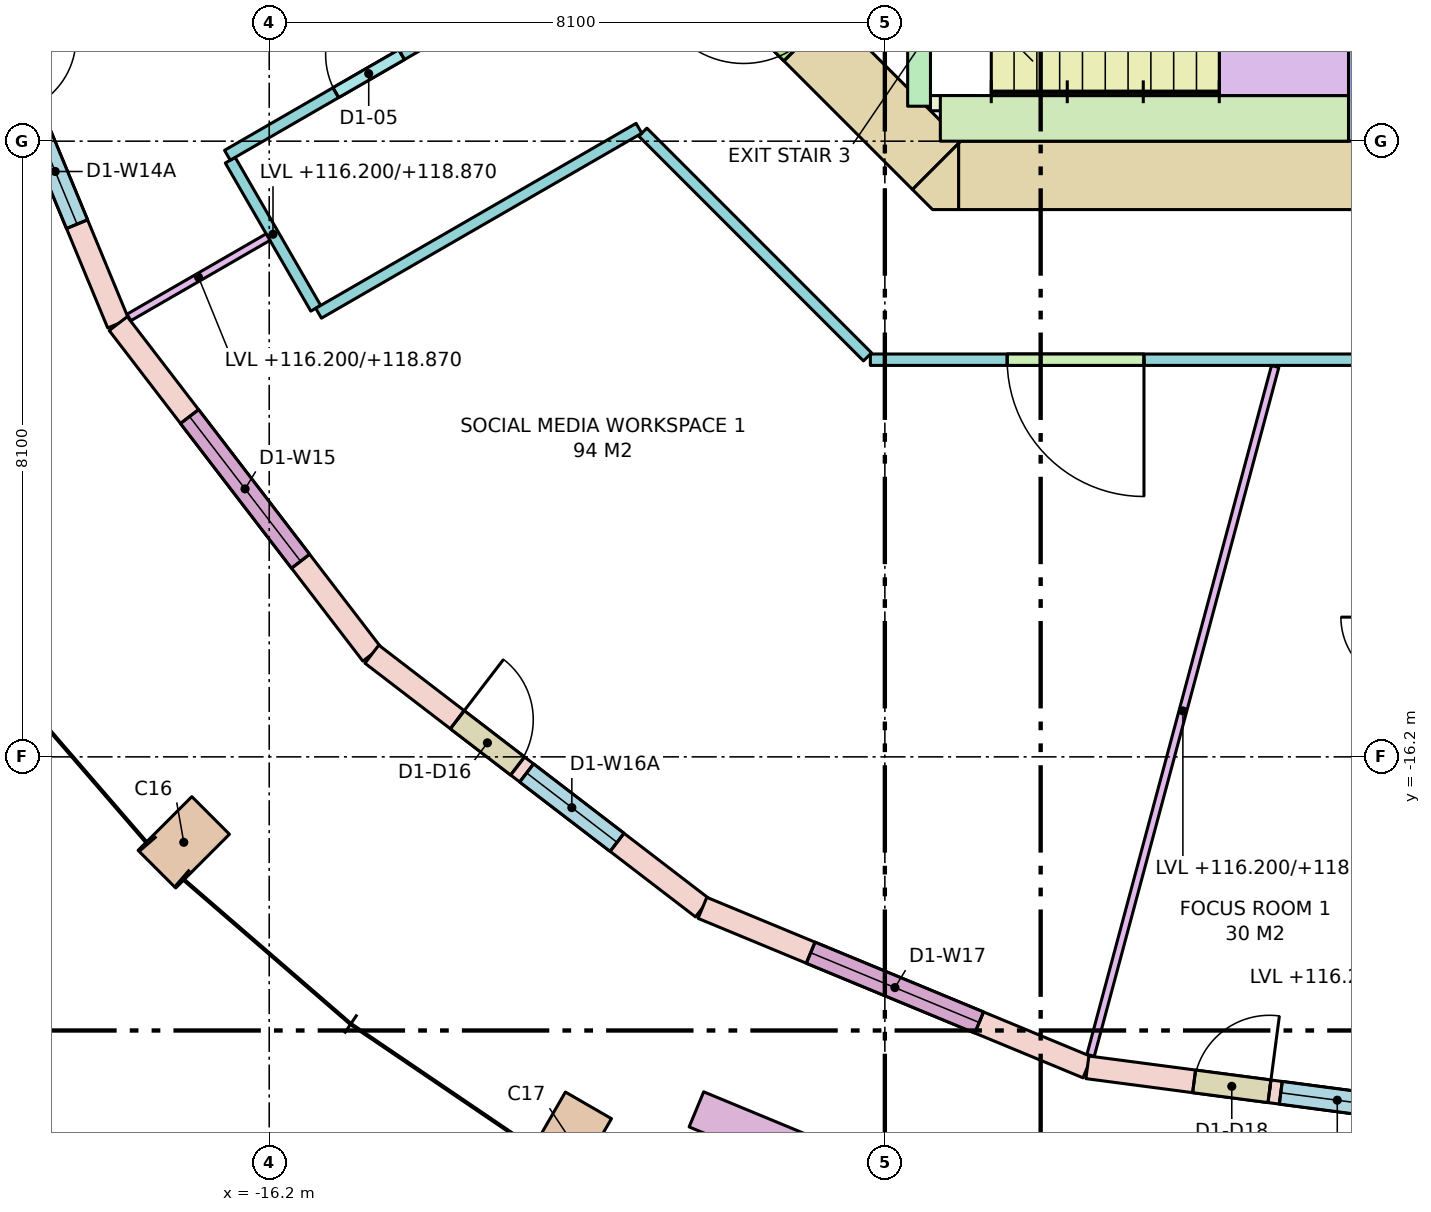
"""IFC4 building model, lengths in metres.
Left out: names, types, materials, properties, quantities, classifications, styles, units other than length and angle.
Written with IfcOpenShell. Run it as: python <this file> out.ifc"""

import sys

from ifc_helpers import new_model, si_unit, direction, frame, frame_2d, origin, origin_2d, place, context, subcontext, project, spatial, polyline, rectangle, outline, extrude, element, fill, save


model = new_model("IFC4")
c1 = context("Model", 3, precision=1e-05, world=origin(), true_north=direction((0.0, 1.0)))
c2 = subcontext(c1, "Body", "Model", "MODEL_VIEW")
j1 = project(units=[si_unit("LENGTHUNIT", "METRE"), si_unit("PLANEANGLEUNIT", "RADIAN")], contexts=[c1])
p1 = place(None, origin())
s1 = spatial("IfcSite", under=j1, at=p1, CompositionType="ELEMENT")
p2 = place(p1, origin())
s2 = spatial("IfcBuilding", under=s1, at=p2, CompositionType="ELEMENT")
p3 = place(p2, frame((0.0, 0.0, 116.2)))
s3 = spatial("IfcBuildingStorey", under=s2, at=p3, CompositionType="ELEMENT", Elevation=116.2)
for number, where, z_axis, x_axis in (
    (1, (-17.324, -17.324, 0.0), (0.0, 0.0, 1.0), (0.707, -0.707, 0.0)),
    (2, (-12.25, -21.218, 0.0), (0.0, 0.0, 1.0), (0.866, -0.5, 0.0)),
):
    element("IfcColumn", number, at=place(p3, frame(where, z_axis=z_axis, x_axis=x_axis)), inside=s3, PredefinedType="COLUMN", context=c2, shape_type="SweptSolid", body=[
        extrude(rectangle(XDim=0.7, YDim=1.0, at=origin_2d()), origin(), (0.0, 0.0, 1.0), 3.8),
    ])
p4 = place(p3, frame((-7.13, -8.55, -0.28), z_axis=(0.0, 0.0, 1.0), x_axis=(1.0, 0.0, 0.0)))
e3 = element("IfcWall", 3, at=p4, inside=s3, PredefinedType="SHEAR", context=c2, shape_type="SweptSolid", body=[
    extrude(rectangle(XDim=14.26, YDim=0.9, at=frame_2d((7.13, 0.0))), origin(), (0.0, 0.0, 1.0), 3.8),
])
p5 = place(p4, frame((8.08, 0.0, 0.28)))
e4 = element("IfcOpeningElement", 4, at=p5, cuts=e3, PredefinedType="OPENING", context=c2, shape_type="SweptSolid", body=[
    extrude(rectangle(XDim=0.7, YDim=2.1, at=frame_2d((0.35, 1.05))), frame((0.0, 0.46, 0.0), z_axis=(0.0, -1.0, 0.0), x_axis=(1.0, 0.0, 0.0)), (0.0, 0.0, 1.0), 0.92),
])
p6 = place(p4, frame((5.58, 0.0, 0.28)))
e5 = element("IfcOpeningElement", 5, at=p6, cuts=e3, PredefinedType="OPENING", context=c2, shape_type="SweptSolid", body=[
    extrude(rectangle(XDim=0.85, YDim=2.1, at=frame_2d((0.425, 1.05))), frame((0.0, 0.46, 0.0), z_axis=(0.0, -1.0, 0.0), x_axis=(1.0, 0.0, 0.0)), (0.0, 0.0, 1.0), 0.92),
])
p7 = place(p4, frame((6.88, 0.0, 0.28)))
e6 = element("IfcOpeningElement", 6, at=p7, cuts=e3, PredefinedType="OPENING", context=c2, shape_type="SweptSolid", body=[
    extrude(rectangle(XDim=0.85, YDim=2.1, at=frame_2d((0.425, 1.05))), frame((0.0, 0.46, 0.0), z_axis=(0.0, -1.0, 0.0), x_axis=(1.0, 0.0, 0.0)), (0.0, 0.0, 1.0), 0.92),
])
p8 = place(p4, frame((9.967, 0.0, 0.28)))
e7 = element("IfcOpeningElement", 7, at=p8, cuts=e3, PredefinedType="OPENING", context=c2, shape_type="SweptSolid", body=[
    extrude(rectangle(XDim=0.9, YDim=2.1, at=frame_2d((0.45, 1.05))), frame((0.0, 0.46, 0.0), z_axis=(0.0, -1.0, 0.0), x_axis=(1.0, 0.0, 0.0)), (0.0, 0.0, 1.0), 0.92),
])
p9 = place(p4, frame((12.567, 0.0, 0.28)))
e8 = element("IfcOpeningElement", 8, at=p9, cuts=e3, PredefinedType="OPENING", context=c2, shape_type="SweptSolid", body=[
    extrude(rectangle(XDim=0.9, YDim=2.1, at=frame_2d((0.45, 1.05))), frame((0.0, 0.46, 0.0), z_axis=(0.0, -1.0, 0.0), x_axis=(1.0, 0.0, 0.0)), (0.0, 0.0, 1.0), 0.92),
])
p10 = place(p3, frame((-7.418, -8.418, -0.28), z_axis=(0.0, 0.0, 1.0), x_axis=(-0.707106781187, 0.707106781187, 0.0)))
e9 = element("IfcWall", 9, at=p10, inside=s3, PredefinedType="SHEAR", context=c2, shape_type="SweptSolid", body=[
    extrude(rectangle(XDim=4.243, YDim=0.9, at=frame_2d((2.121, 0.0))), origin(), (0.0, 0.0, 1.0), 3.8),
])
p11 = place(p10, frame((2.393, 0.0, 0.28)))
e10 = element("IfcOpeningElement", 10, at=p11, cuts=e9, PredefinedType="OPENING", context=c2, shape_type="SweptSolid", body=[
    extrude(rectangle(XDim=1.2, YDim=2.1, at=frame_2d((0.6, 1.05))), frame((0.0, 0.46, 0.0), z_axis=(0.0, -1.0, 0.0), x_axis=(1.0, 0.0, 0.0)), (0.0, 0.0, 1.0), 0.92),
])
p12 = place(p3, frame((0.0, 0.0, -0.28)))
e11 = element("IfcWall", 11, at=p12, inside=s3, PredefinedType="SHEAR", context=c2, shape_type="SweptSolid", body=[
    extrude(outline(polyline([(-7.473, -9.0), (-7.736, -8.736), (-7.13, -8.13), (-7.13, -9.0), (-7.473, -9.0)])), origin(), (0.0, 0.0, 1.0), 3.8),
])
p13 = place(p3, frame((-1.85, -8.1, 0.0), z_axis=(0.0, 0.0, 1.0), x_axis=(0.0, 1.0, 0.0)))
e12 = element("IfcWall", 12, at=p13, inside=s3, PredefinedType="SHEAR", context=c2, shape_type="SweptSolid", body=[
    extrude(rectangle(XDim=6.6, YDim=0.3, at=frame_2d((3.3, 0.0))), origin(), (0.0, 0.0, 1.0), 3.52),
])
p14 = place(p3, frame((-7.65, -7.64, 0.0), z_axis=(0.0, 0.0, 1.0), x_axis=(0.0, 1.0, 0.0)))
e13 = element("IfcWall", 13, at=p14, inside=s3, PredefinedType="SHEAR", context=c2, shape_type="SweptSolid", body=[
    extrude(rectangle(XDim=3.14, YDim=0.3, at=frame_2d((1.57, 0.0))), origin(), (0.0, 0.0, 1.0), 3.52),
])
p15 = place(p14, frame((1.68, 0.0, 0.0)))
e14 = element("IfcOpeningElement", 14, at=p15, cuts=e13, PredefinedType="OPENING", context=c2, shape_type="SweptSolid", body=[
    extrude(rectangle(XDim=1.32, YDim=2.1, at=frame_2d((0.66, 1.05))), frame((0.0, 0.16, 0.0), z_axis=(0.0, -1.0, 0.0), x_axis=(1.0, 0.0, 0.0)), (0.0, 0.0, 1.0), 0.32),
])
p16 = place(p3, frame((-7.5, -7.6, 0.0), z_axis=(0.0, 0.0, 1.0), x_axis=(1.0, 0.0, 0.0)))
e15 = element("IfcWall", 15, at=p16, inside=s3, PredefinedType="SHEAR", context=c2, shape_type="SweptSolid", body=[
    extrude(rectangle(XDim=0.6, YDim=0.2, at=frame_2d((0.3, 0.0))), origin(), (0.0, 0.0, 1.0), 3.52),
])
p17 = place(p3, frame((-7.37, -7.8, 0.0), z_axis=(0.0, 0.0, 1.0), x_axis=(1.0, 0.0, 0.0)))
e16 = element("IfcWall", 16, at=p17, inside=s3, PredefinedType="SHEAR", context=c2, shape_type="SweptSolid", body=[
    extrude(rectangle(XDim=5.37, YDim=0.6, at=frame_2d((2.685, 0.0))), origin(), (0.0, 0.0, 1.0), 3.52),
])
p18 = place(p3, frame((-20.284, -5.435, 0.0), z_axis=(0.0, 0.0, 1.0), x_axis=(0.382688740813, -0.923877333662, 0.0)))
e17 = element("IfcWall", 17, at=p18, inside=s3, PredefinedType="STANDARD", context=c2, shape_type="SweptSolid", body=[
    extrude(rectangle(XDim=5.482, YDim=0.3, at=frame_2d((2.741, 0.0))), origin(), (0.0, 0.0, 1.0), 3.52),
])
p19 = place(p18, frame((1.416, 0.0, 0.0)))
e18 = element("IfcOpeningElement", 18, at=p19, cuts=e17, PredefinedType="OPENING", context=c2, shape_type="SweptSolid", body=[
    extrude(rectangle(XDim=1.0, YDim=2.4, at=frame_2d((0.5, 1.2))), frame((0.0, 0.16, 0.0), z_axis=(0.0, -1.0, 0.0), x_axis=(1.0, 0.0, 0.0)), (0.0, 0.0, 1.0), 0.32),
])
p20 = place(p18, frame((2.566, 0.0, 0.8)))
e19 = element("IfcOpeningElement", 19, at=p20, cuts=e17, PredefinedType="OPENING", context=c2, shape_type="SweptSolid", body=[
    extrude(rectangle(XDim=1.5, YDim=2.5, at=frame_2d((0.75, 1.25))), frame((0.0, 0.16, 0.0), z_axis=(0.0, -1.0, 0.0), x_axis=(1.0, 0.0, 0.0)), (0.0, 0.0, 1.0), 0.32),
])
p21 = place(p3, frame((-18.187, -10.5, 0.0), z_axis=(0.0, 0.0, 1.0), x_axis=(0.608784891166, -0.793335336593, 0.0)))
e20 = element("IfcWall", 20, at=p21, inside=s3, PredefinedType="STANDARD", context=c2, shape_type="SweptSolid", body=[
    extrude(rectangle(XDim=5.482, YDim=0.3, at=frame_2d((2.741, 0.0))), origin(), (0.0, 0.0, 1.0), 3.52),
])
p22 = place(p21, frame((1.541, 0.0, 0.8)))
e21 = element("IfcOpeningElement", 21, at=p22, cuts=e20, PredefinedType="OPENING", context=c2, shape_type="SweptSolid", body=[
    extrude(rectangle(XDim=2.4, YDim=2.5, at=frame_2d((1.2, 1.25))), frame((0.0, 0.16, 0.0), z_axis=(0.0, -1.0, 0.0), x_axis=(1.0, 0.0, 0.0)), (0.0, 0.0, 1.0), 0.32),
])
p23 = place(p3, frame((-14.849, -14.849, 0.0), z_axis=(0.0, 0.0, 1.0), x_axis=(0.793335336593, -0.608784891166, 0.0)))
e22 = element("IfcWall", 22, at=p23, inside=s3, PredefinedType="STANDARD", context=c2, shape_type="SweptSolid", body=[
    extrude(rectangle(XDim=5.482, YDim=0.3, at=frame_2d((2.741, 0.0))), origin(), (0.0, 0.0, 1.0), 3.52),
])
p24 = place(p23, frame((1.416, 0.0, 0.0)))
e23 = element("IfcOpeningElement", 23, at=p24, cuts=e22, PredefinedType="OPENING", context=c2, shape_type="SweptSolid", body=[
    extrude(rectangle(XDim=1.0, YDim=2.4, at=frame_2d((0.5, 1.2))), frame((0.0, 0.16, 0.0), z_axis=(0.0, -1.0, 0.0), x_axis=(1.0, 0.0, 0.0)), (0.0, 0.0, 1.0), 0.32),
])
p25 = place(p23, frame((2.566, 0.0, 0.8)))
e24 = element("IfcOpeningElement", 24, at=p25, cuts=e22, PredefinedType="OPENING", context=c2, shape_type="SweptSolid", body=[
    extrude(rectangle(XDim=1.5, YDim=2.5, at=frame_2d((0.75, 1.25))), frame((0.0, 0.16, 0.0), z_axis=(0.0, -1.0, 0.0), x_axis=(1.0, 0.0, 0.0)), (0.0, 0.0, 1.0), 0.32),
])
p26 = place(p3, frame((-10.5, -18.187, 0.0), z_axis=(0.0, 0.0, 1.0), x_axis=(0.923877333662, -0.382688740813, 0.0)))
e25 = element("IfcWall", 25, at=p26, inside=s3, PredefinedType="STANDARD", context=c2, shape_type="SweptSolid", body=[
    extrude(rectangle(XDim=5.482, YDim=0.3, at=frame_2d((2.741, 0.0))), origin(), (0.0, 0.0, 1.0), 3.52),
])
p27 = place(p26, frame((1.541, 0.0, 0.8)))
e26 = element("IfcOpeningElement", 26, at=p27, cuts=e25, PredefinedType="OPENING", context=c2, shape_type="SweptSolid", body=[
    extrude(rectangle(XDim=2.4, YDim=2.5, at=frame_2d((1.2, 1.25))), frame((0.0, 0.16, 0.0), z_axis=(0.0, -1.0, 0.0), x_axis=(1.0, 0.0, 0.0)), (0.0, 0.0, 1.0), 0.32),
])
p28 = place(p3, frame((-5.435, -20.284, 0.0), z_axis=(0.0, 0.0, 1.0), x_axis=(0.991444743541, -0.130527087244, 0.0)))
e27 = element("IfcWall", 27, at=p28, inside=s3, PredefinedType="STANDARD", context=c2, shape_type="SweptSolid", body=[
    extrude(rectangle(XDim=5.482, YDim=0.3, at=frame_2d((2.741, 0.0))), origin(), (0.0, 0.0, 1.0), 3.52),
])
p29 = place(p28, frame((1.416, 0.0, 0.0)))
e28 = element("IfcOpeningElement", 28, at=p29, cuts=e27, PredefinedType="OPENING", context=c2, shape_type="SweptSolid", body=[
    extrude(rectangle(XDim=1.0, YDim=2.4, at=frame_2d((0.5, 1.2))), frame((0.0, 0.16, 0.0), z_axis=(0.0, -1.0, 0.0), x_axis=(1.0, 0.0, 0.0)), (0.0, 0.0, 1.0), 0.32),
])
p30 = place(p28, frame((2.566, 0.0, 0.8)))
e29 = element("IfcOpeningElement", 29, at=p30, cuts=e27, PredefinedType="OPENING", context=c2, shape_type="SweptSolid", body=[
    extrude(rectangle(XDim=1.5, YDim=2.5, at=frame_2d((0.75, 1.25))), frame((0.0, 0.16, 0.0), z_axis=(0.0, -1.0, 0.0), x_axis=(1.0, 0.0, 0.0)), (0.0, 0.0, 1.0), 0.32),
])
p31 = place(p3, frame((-10.58, -20.838, 0.0), z_axis=(0.0, 0.0, 1.0), x_axis=(0.923909393783, -0.382611332921, 0.0)))
e30 = element("IfcWall", 30, at=p31, inside=s3, PredefinedType="PARAPET", context=c2, shape_type="SweptSolid", body=[
    extrude(rectangle(XDim=3.6, YDim=0.5, at=frame_2d((1.8, 0.0))), origin(), (0.0, 0.0, 1.0), 0.9),
])
p32 = place(p3, frame((-15.588, -10.299, 0.0), z_axis=(0.0, 0.0, 1.0), x_axis=(-0.500013631625, 0.866017533419, 0.0)))
e31 = element("IfcWall", 31, at=p32, inside=s3, PredefinedType="PARTITIONING", context=c2, shape_type="SweptSolid", body=[
    extrude(rectangle(XDim=2.25, YDim=0.15, at=frame_2d((1.125, 0.0))), origin(), (0.0, 0.0, 1.0), 2.67),
])
p33 = place(p3, frame((-16.75, -8.285, 0.0), z_axis=(0.0, 0.0, 1.0), x_axis=(0.866019905438, 0.500009523294, 0.0)))
e32 = element("IfcWall", 32, at=p33, inside=s3, PredefinedType="PARTITIONING", context=c2, shape_type="SweptSolid", body=[
    extrude(rectangle(XDim=4.294, YDim=0.15, at=frame_2d((2.147, 0.0))), origin(), (0.0, 0.0, 1.0), 3.52),
])
p34 = place(p33, frame((1.647, 0.0, 0.0)))
e33 = element("IfcOpeningElement", 33, at=p34, cuts=e32, PredefinedType="OPENING", context=c2, shape_type="SweptSolid", body=[
    extrude(rectangle(XDim=1.0, YDim=2.1, at=frame_2d((0.5, 1.05))), frame((0.0, 0.085, 0.0), z_axis=(0.0, -1.0, 0.0), x_axis=(1.0, 0.0, 0.0)), (0.0, 0.0, 1.0), 0.17),
])
p35 = place(p3, frame((-1.275, -10.975, 0.0), z_axis=(0.0, 0.0, 1.0), x_axis=(-1.0, 0.0, 0.0)))
e34 = element("IfcWall", 34, at=p35, inside=s3, PredefinedType="PARTITIONING", context=c2, shape_type="SweptSolid", body=[
    extrude(rectangle(XDim=7.016, YDim=0.15, at=frame_2d((3.508, 0.0))), origin(), (0.0, 0.0, 1.0), 2.67),
])
p36 = place(p35, frame((3.416, 0.0, 0.0)))
e35 = element("IfcOpeningElement", 35, at=p36, cuts=e34, PredefinedType="OPENING", context=c2, shape_type="SweptSolid", body=[
    extrude(rectangle(XDim=1.8, YDim=2.1, at=frame_2d((0.9, 1.05))), frame((0.0, 0.085, 0.0), z_axis=(0.0, -1.0, 0.0), x_axis=(1.0, 0.0, 0.0)), (0.0, 0.0, 1.0), 0.17),
])
p37 = place(p3, frame((-8.328, -10.938, 0.0), z_axis=(0.0, 0.0, 1.0), x_axis=(-0.707077584218, 0.707135976949, 0.0)))
e36 = element("IfcWall", 36, at=p37, inside=s3, PredefinedType="PARTITIONING", context=c2, shape_type="SweptSolid", body=[
    extrude(rectangle(XDim=4.181, YDim=0.15, at=frame_2d((2.09, 0.0))), origin(), (0.0, 0.0, 1.0), 2.67),
])
p38 = place(p3, frame((-11.336, -7.93, 0.0), z_axis=(0.0, 0.0, 1.0), x_axis=(-0.866042731792, -0.49996998581, 0.0)))
e37 = element("IfcWall", 37, at=p38, inside=s3, PredefinedType="PARTITIONING", context=c2, shape_type="SweptSolid", body=[
    extrude(rectangle(XDim=4.866, YDim=0.15, at=frame_2d((2.433, 0.0))), origin(), (0.0, 0.0, 1.0), 3.52),
])
p39 = place(p3, frame((-16.215, -9.362, 0.0), z_axis=(0.0, 0.0, 1.0), x_axis=(-0.866016279763, -0.500015802937, 0.0)))
e38 = element("IfcWall", 38, at=p39, inside=s3, PredefinedType="PARTITIONING", context=c2, shape_type="SweptSolid", body=[
    extrude(rectangle(XDim=2.113, YDim=0.1, at=frame_2d((1.057, 0.0))), origin(), (0.0, 0.0, 1.0), 2.67),
])
p40 = place(p3, frame((-2.965, -11.064, 0.0), z_axis=(0.0, 0.0, 1.0), x_axis=(-0.258812392192, -0.965927608906, 0.0)))
e39 = element("IfcWall", 39, at=p40, inside=s3, PredefinedType="PARTITIONING", context=c2, shape_type="SweptSolid", body=[
    extrude(rectangle(XDim=9.382, YDim=0.1, at=frame_2d((4.691, 0.0))), origin(), (0.0, 0.0, 1.0), 2.67),
])
p41 = place(p20, origin())
e40 = element("IfcWindow", 40, at=p41, inside=s3, PartitioningType="SINGLE_PANEL", PredefinedType="WINDOW", context=c2, shape_type="SweptSolid", body=[
    extrude(rectangle(XDim=1.5, YDim=2.5, at=frame_2d((0.75, 1.25))), frame((0.0, 0.03, 0.0), z_axis=(0.0, -1.0, 0.0), x_axis=(1.0, 0.0, 0.0)), (0.0, 0.0, 1.0), 0.06),
])
fill(e19, e40)
p42 = place(p22, origin())
e41 = element("IfcWindow", 41, at=p42, inside=s3, PartitioningType="SINGLE_PANEL", PredefinedType="WINDOW", context=c2, shape_type="SweptSolid", body=[
    extrude(rectangle(XDim=2.4, YDim=2.5, at=frame_2d((1.2, 1.25))), frame((0.0, 0.03, 0.0), z_axis=(0.0, -1.0, 0.0), x_axis=(1.0, 0.0, 0.0)), (0.0, 0.0, 1.0), 0.06),
])
fill(e21, e41)
p43 = place(p24, origin())
e42 = element("IfcDoor", 42, at=p43, inside=s3, OperationType="SINGLE_SWING_LEFT", PredefinedType="DOOR", context=c2, shape_type="SweptSolid", body=[
    extrude(rectangle(XDim=1.0, YDim=2.4, at=frame_2d((0.5, 1.2))), frame((0.0, 0.025, 0.0), z_axis=(0.0, -1.0, 0.0), x_axis=(1.0, 0.0, 0.0)), (0.0, 0.0, 1.0), 0.05),
])
fill(e23, e42)
p44 = place(p25, origin())
e43 = element("IfcWindow", 43, at=p44, inside=s3, PartitioningType="SINGLE_PANEL", PredefinedType="WINDOW", context=c2, shape_type="SweptSolid", body=[
    extrude(rectangle(XDim=1.5, YDim=2.5, at=frame_2d((0.75, 1.25))), frame((0.0, 0.03, 0.0), z_axis=(0.0, -1.0, 0.0), x_axis=(1.0, 0.0, 0.0)), (0.0, 0.0, 1.0), 0.06),
])
fill(e24, e43)
p45 = place(p27, origin())
e44 = element("IfcWindow", 44, at=p45, inside=s3, PartitioningType="SINGLE_PANEL", PredefinedType="WINDOW", context=c2, shape_type="SweptSolid", body=[
    extrude(rectangle(XDim=2.4, YDim=2.5, at=frame_2d((1.2, 1.25))), frame((0.0, 0.03, 0.0), z_axis=(0.0, -1.0, 0.0), x_axis=(1.0, 0.0, 0.0)), (0.0, 0.0, 1.0), 0.06),
])
fill(e26, e44)
p46 = place(p29, origin())
e45 = element("IfcDoor", 45, at=p46, inside=s3, OperationType="SINGLE_SWING_RIGHT", PredefinedType="DOOR", context=c2, shape_type="SweptSolid", body=[
    extrude(rectangle(XDim=1.0, YDim=2.4, at=frame_2d((0.5, 1.2))), frame((0.0, 0.025, 0.0), z_axis=(0.0, -1.0, 0.0), x_axis=(1.0, 0.0, 0.0)), (0.0, 0.0, 1.0), 0.05),
])
fill(e28, e45)
p47 = place(p30, origin())
e46 = element("IfcWindow", 46, at=p47, inside=s3, PartitioningType="SINGLE_PANEL", PredefinedType="WINDOW", context=c2, shape_type="SweptSolid", body=[
    extrude(rectangle(XDim=1.5, YDim=2.5, at=frame_2d((0.75, 1.25))), frame((0.0, 0.03, 0.0), z_axis=(0.0, -1.0, 0.0), x_axis=(1.0, 0.0, 0.0)), (0.0, 0.0, 1.0), 0.06),
])
fill(e29, e46)
p48 = place(p34, origin())
e47 = element("IfcDoor", 47, at=p48, inside=s3, OperationType="SINGLE_SWING_RIGHT", PredefinedType="DOOR", context=c2, shape_type="SweptSolid", body=[
    extrude(rectangle(XDim=1.0, YDim=2.1, at=frame_2d((0.5, 1.05))), frame((0.0, 0.025, 0.0), z_axis=(0.0, -1.0, 0.0), x_axis=(1.0, 0.0, 0.0)), (0.0, 0.0, 1.0), 0.05),
])
fill(e33, e47)
p49 = place(p36, origin())
e48 = element("IfcDoor", 48, at=p49, inside=s3, OperationType="DOUBLE_DOOR_SINGLE_SWING", PredefinedType="DOOR", context=c2, shape_type="SweptSolid", body=[
    extrude(rectangle(XDim=1.8, YDim=2.1, at=frame_2d((0.9, 1.05))), frame((0.0, 0.025, 0.0), z_axis=(0.0, -1.0, 0.0), x_axis=(1.0, 0.0, 0.0)), (0.0, 0.0, 1.0), 0.05),
])
fill(e35, e48)
save(model, sys.argv[1])
